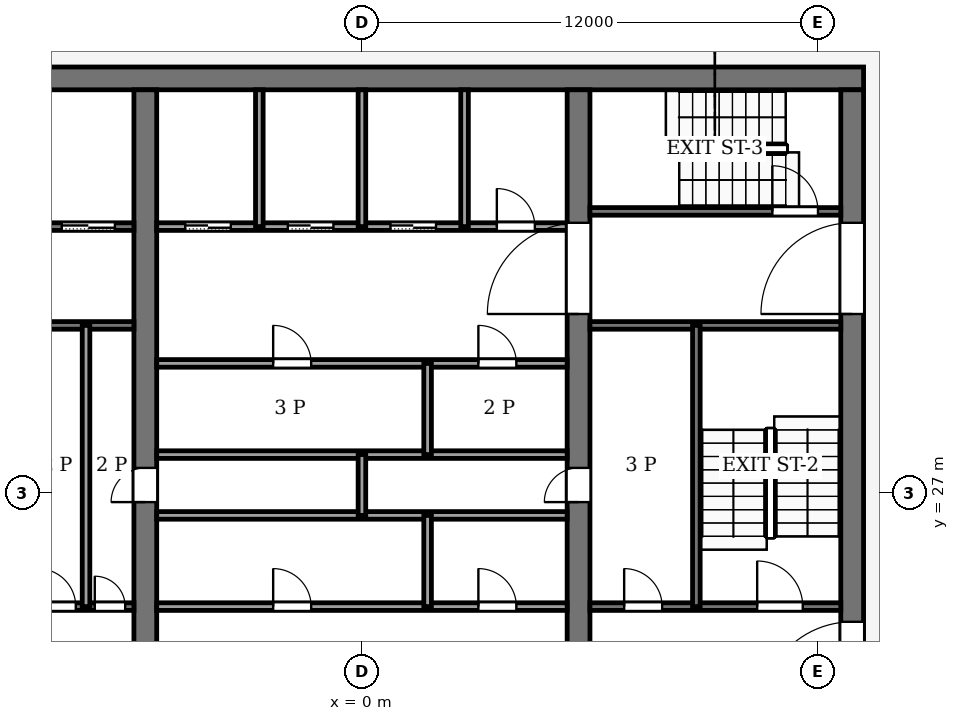
"""IFC4 building model, lengths in metres.
Left out: names, types, materials, properties, quantities, classifications, styles, units other than length and angle.
Written with IfcOpenShell. Run it as: python <this file> out.ifc"""

import sys

from ifc_helpers import new_model, si_unit, direction, frame, frame_2d, origin, place, context, subcontext, project, spatial, rectangle, extrude, element, fill, save


model = new_model("IFC4")
c1 = context("Model", 3, precision=1e-05, world=origin(), true_north=direction((0.0, 1.0)))
c2 = subcontext(c1, "Body", "Model", "MODEL_VIEW")
j1 = project(units=[si_unit("LENGTHUNIT", "METRE"), si_unit("PLANEANGLEUNIT", "RADIAN")], contexts=[c1])
p1 = place(None, origin())
s1 = spatial("IfcSite", under=j1, at=p1, CompositionType="ELEMENT")
p2 = place(p1, origin())
s2 = spatial("IfcBuilding", under=s1, at=p2, CompositionType="ELEMENT")
p3 = place(p2, frame((0.0, 0.0, 334.0)))
s3 = spatial("IfcBuildingStorey", under=s2, at=p3, CompositionType="ELEMENT", Elevation=334.0)
p4 = place(p3, frame((-13.2, 37.9, -0.18), z_axis=(0.0, 0.0, 1.0), x_axis=(1.0, 0.0, 0.0)))
e1 = element("IfcWall", 1, at=p4, inside=s3, PredefinedType="SHEAR", context=c2, shape_type="SweptSolid", body=[
    extrude(rectangle(XDim=26.4, YDim=0.6, at=frame_2d((13.2, 0.0))), origin(), (0.0, 0.0, 1.0), 6.53),
])
p5 = place(p3, frame((12.9, 18.4, -0.18), z_axis=(0.0, 0.0, 1.0), x_axis=(0.0, 1.0, 0.0)))
e2 = element("IfcWall", 2, at=p5, inside=s3, PredefinedType="SHEAR", context=c2, shape_type="SweptSolid", body=[
    extrude(rectangle(XDim=19.2, YDim=0.6, at=frame_2d((9.6, 0.0))), origin(), (0.0, 0.0, 1.0), 6.53),
])
p6 = place(p5, frame((2.8, 0.0, 0.18)))
e3 = element("IfcOpeningElement", 3, at=p6, cuts=e2, PredefinedType="OPENING", context=c2, shape_type="SweptSolid", body=[
    extrude(rectangle(XDim=2.4, YDim=2.4, at=frame_2d((1.2, 1.2))), frame((0.0, 0.31, 0.0), z_axis=(0.0, -1.0, 0.0), x_axis=(1.0, 0.0, 0.0)), (0.0, 0.0, 1.0), 0.62),
])
p7 = place(p5, frame((13.3, 0.0, 0.18)))
e4 = element("IfcOpeningElement", 4, at=p7, cuts=e2, PredefinedType="OPENING", context=c2, shape_type="SweptSolid", body=[
    extrude(rectangle(XDim=2.4, YDim=2.4, at=frame_2d((1.2, 1.2))), frame((0.0, 0.31, 0.0), z_axis=(0.0, -1.0, 0.0), x_axis=(1.0, 0.0, 0.0)), (0.0, 0.0, 1.0), 0.62),
])
p8 = place(p3, frame((-5.7, 18.4, -0.18), z_axis=(0.0, 0.0, 1.0), x_axis=(0.0, 1.0, 0.0)))
e5 = element("IfcWall", 5, at=p8, inside=s3, PredefinedType="SHEAR", context=c2, shape_type="SweptSolid", body=[
    extrude(rectangle(XDim=19.2, YDim=0.6, at=frame_2d((9.6, 0.0))), origin(), (0.0, 0.0, 1.0), 6.53),
])
p9 = place(p8, frame((8.35, 0.0, 0.18)))
e6 = element("IfcOpeningElement", 6, at=p9, cuts=e5, PredefinedType="OPENING", context=c2, shape_type="SweptSolid", body=[
    extrude(rectangle(XDim=0.9, YDim=2.1, at=frame_2d((0.45, 1.05))), frame((0.0, 0.31, 0.0), z_axis=(0.0, -1.0, 0.0), x_axis=(1.0, 0.0, 0.0)), (0.0, 0.0, 1.0), 0.62),
])
p10 = place(p3, frame((5.7, 18.4, -0.18), z_axis=(0.0, 0.0, 1.0), x_axis=(0.0, 1.0, 0.0)))
e7 = element("IfcWall", 7, at=p10, inside=s3, PredefinedType="SHEAR", context=c2, shape_type="SweptSolid", body=[
    extrude(rectangle(XDim=19.2, YDim=0.6, at=frame_2d((9.6, 0.0))), origin(), (0.0, 0.0, 1.0), 6.53),
])
p11 = place(p10, frame((8.35, 0.0, 0.18)))
e8 = element("IfcOpeningElement", 8, at=p11, cuts=e7, PredefinedType="OPENING", context=c2, shape_type="SweptSolid", body=[
    extrude(rectangle(XDim=0.9, YDim=2.1, at=frame_2d((0.45, 1.05))), frame((0.0, 0.31, 0.0), z_axis=(0.0, -1.0, 0.0), x_axis=(1.0, 0.0, 0.0)), (0.0, 0.0, 1.0), 0.62),
])
p12 = place(p10, frame((13.3, 0.0, 0.18)))
e9 = element("IfcOpeningElement", 9, at=p12, cuts=e7, PredefinedType="OPENING", context=c2, shape_type="SweptSolid", body=[
    extrude(rectangle(XDim=2.4, YDim=2.4, at=frame_2d((1.2, 1.2))), frame((0.0, 0.31, 0.0), z_axis=(0.0, -1.0, 0.0), x_axis=(1.0, 0.0, 0.0)), (0.0, 0.0, 1.0), 0.62),
])
p13 = place(p3, frame((-12.6, 24.0, 0.0), z_axis=(0.0, 0.0, 1.0), x_axis=(1.0, 0.0, 0.0)))
e10 = element("IfcWall", 10, at=p13, inside=s3, PredefinedType="PARTITIONING", context=c2, shape_type="SweptSolid", body=[
    extrude(rectangle(XDim=6.6, YDim=0.2, at=frame_2d((3.3, 0.0))), origin(), (0.0, 0.0, 1.0), 6.35),
])
p14 = place(p13, frame((4.07, 0.0, 0.0)))
e11 = element("IfcOpeningElement", 11, at=p14, cuts=e10, PredefinedType="OPENING", context=c2, shape_type="SweptSolid", body=[
    extrude(rectangle(XDim=1.0, YDim=2.1, at=frame_2d((0.5, 1.05))), frame((0.0, 0.11, 0.0), z_axis=(0.0, -1.0, 0.0), x_axis=(1.0, 0.0, 0.0)), (0.0, 0.0, 1.0), 0.22),
])
p15 = place(p13, frame((5.57, 0.0, 0.0)))
e12 = element("IfcOpeningElement", 12, at=p15, cuts=e10, PredefinedType="OPENING", context=c2, shape_type="SweptSolid", body=[
    extrude(rectangle(XDim=0.8, YDim=2.1, at=frame_2d((0.4, 1.05))), frame((0.0, 0.11, 0.0), z_axis=(0.0, -1.0, 0.0), x_axis=(1.0, 0.0, 0.0)), (0.0, 0.0, 1.0), 0.22),
])
p16 = place(p3, frame((-5.4, 24.0, 0.0), z_axis=(0.0, 0.0, 1.0), x_axis=(1.0, 0.0, 0.0)))
e13 = element("IfcWall", 13, at=p16, inside=s3, PredefinedType="PARTITIONING", context=c2, shape_type="SweptSolid", body=[
    extrude(rectangle(XDim=10.8, YDim=0.2, at=frame_2d((5.4, 0.0))), origin(), (0.0, 0.0, 1.0), 6.35),
])
p17 = place(p16, frame((3.064, 0.0, 0.0)))
e14 = element("IfcOpeningElement", 14, at=p17, cuts=e13, PredefinedType="OPENING", context=c2, shape_type="SweptSolid", body=[
    extrude(rectangle(XDim=1.0, YDim=2.1, at=frame_2d((0.5, 1.05))), frame((0.0, 0.11, 0.0), z_axis=(0.0, -1.0, 0.0), x_axis=(1.0, 0.0, 0.0)), (0.0, 0.0, 1.0), 0.22),
])
p18 = place(p16, frame((8.464, 0.0, 0.0)))
e15 = element("IfcOpeningElement", 15, at=p18, cuts=e13, PredefinedType="OPENING", context=c2, shape_type="SweptSolid", body=[
    extrude(rectangle(XDim=1.0, YDim=2.1, at=frame_2d((0.5, 1.05))), frame((0.0, 0.11, 0.0), z_axis=(0.0, -1.0, 0.0), x_axis=(1.0, 0.0, 0.0)), (0.0, 0.0, 1.0), 0.22),
])
p19 = place(p3, frame((6.0, 24.0, 0.0), z_axis=(0.0, 0.0, 1.0), x_axis=(1.0, 0.0, 0.0)))
e16 = element("IfcWall", 16, at=p19, inside=s3, PredefinedType="PARTITIONING", context=c2, shape_type="SweptSolid", body=[
    extrude(rectangle(XDim=6.6, YDim=0.2, at=frame_2d((3.3, 0.0))), origin(), (0.0, 0.0, 1.0), 6.35),
])
p20 = place(p19, frame((0.9, 0.0, 0.0)))
e17 = element("IfcOpeningElement", 17, at=p20, cuts=e16, PredefinedType="OPENING", context=c2, shape_type="SweptSolid", body=[
    extrude(rectangle(XDim=1.0, YDim=2.1, at=frame_2d((0.5, 1.05))), frame((0.0, 0.11, 0.0), z_axis=(0.0, -1.0, 0.0), x_axis=(1.0, 0.0, 0.0)), (0.0, 0.0, 1.0), 0.22),
])
p21 = place(p19, frame((4.4, 0.0, 0.0)))
e18 = element("IfcOpeningElement", 18, at=p21, cuts=e16, PredefinedType="OPENING", context=c2, shape_type="SweptSolid", body=[
    extrude(rectangle(XDim=1.2, YDim=2.2, at=frame_2d((0.6, 1.1))), frame((0.0, 0.11, 0.0), z_axis=(0.0, -1.0, 0.0), x_axis=(1.0, 0.0, 0.0)), (0.0, 0.0, 1.0), 0.22),
])
for number, where, z_axis, x_axis in (
    (19, (-5.4, 26.4, 0.0), (0.0, 0.0, 1.0), (1.0, 0.0, 0.0)),
    (20, (-5.4, 28.0, 0.0), (0.0, 0.0, 1.0), (1.0, 0.0, 0.0)),
):
    element("IfcWall", number, at=place(p3, frame(where, z_axis=z_axis, x_axis=x_axis)), inside=s3, PredefinedType="PARTITIONING", context=c2, shape_type="SweptSolid", body=[
        extrude(rectangle(XDim=10.8, YDim=0.2, at=frame_2d((5.4, 0.0))), origin(), (0.0, 0.0, 1.0), 6.35),
    ])
p22 = place(p3, frame((-5.4, 30.4, 0.0), z_axis=(0.0, 0.0, 1.0), x_axis=(1.0, 0.0, 0.0)))
e21 = element("IfcWall", 21, at=p22, inside=s3, PredefinedType="PARTITIONING", context=c2, shape_type="SweptSolid", body=[
    extrude(rectangle(XDim=10.8, YDim=0.2, at=frame_2d((5.4, 0.0))), origin(), (0.0, 0.0, 1.0), 6.35),
])
p23 = place(p22, frame((3.064, 0.0, 0.0)))
e22 = element("IfcOpeningElement", 22, at=p23, cuts=e21, PredefinedType="OPENING", context=c2, shape_type="SweptSolid", body=[
    extrude(rectangle(XDim=1.0, YDim=2.1, at=frame_2d((0.5, 1.05))), frame((0.0, 0.11, 0.0), z_axis=(0.0, -1.0, 0.0), x_axis=(1.0, 0.0, 0.0)), (0.0, 0.0, 1.0), 0.22),
])
p24 = place(p22, frame((8.464, 0.0, 0.0)))
e23 = element("IfcOpeningElement", 23, at=p24, cuts=e21, PredefinedType="OPENING", context=c2, shape_type="SweptSolid", body=[
    extrude(rectangle(XDim=1.0, YDim=2.1, at=frame_2d((0.5, 1.05))), frame((0.0, 0.11, 0.0), z_axis=(0.0, -1.0, 0.0), x_axis=(1.0, 0.0, 0.0)), (0.0, 0.0, 1.0), 0.22),
])
p25 = place(p3, frame((-12.6, 31.4, 0.0), z_axis=(0.0, 0.0, 1.0), x_axis=(1.0, 0.0, 0.0)))
e24 = element("IfcWall", 24, at=p25, inside=s3, PredefinedType="PARTITIONING", context=c2, shape_type="SweptSolid", body=[
    extrude(rectangle(XDim=6.6, YDim=0.2, at=frame_2d((3.3, 0.0))), origin(), (0.0, 0.0, 1.0), 6.35),
])
p26 = place(p25, frame((1.0, 0.0, 0.0)))
e25 = element("IfcOpeningElement", 25, at=p26, cuts=e24, PredefinedType="OPENING", context=c2, shape_type="SweptSolid", body=[
    extrude(rectangle(XDim=1.2, YDim=2.2, at=frame_2d((0.6, 1.1))), frame((0.0, 0.11, 0.0), z_axis=(0.0, -1.0, 0.0), x_axis=(1.0, 0.0, 0.0)), (0.0, 0.0, 1.0), 0.22),
])
p27 = place(p3, frame((6.0, 31.4, 0.0), z_axis=(0.0, 0.0, 1.0), x_axis=(1.0, 0.0, 0.0)))
e26 = element("IfcWall", 26, at=p27, inside=s3, PredefinedType="PARTITIONING", context=c2, shape_type="SweptSolid", body=[
    extrude(rectangle(XDim=6.6, YDim=0.2, at=frame_2d((3.3, 0.0))), origin(), (0.0, 0.0, 1.0), 6.35),
])
p28 = place(p3, frame((-12.6, 34.0, 0.0), z_axis=(0.0, 0.0, 1.0), x_axis=(1.0, 0.0, 0.0)))
e27 = element("IfcWall", 27, at=p28, inside=s3, PredefinedType="PARTITIONING", context=c2, shape_type="SweptSolid", body=[
    extrude(rectangle(XDim=6.6, YDim=0.2, at=frame_2d((3.3, 0.0))), origin(), (0.0, 0.0, 1.0), 6.35),
])
p29 = place(p28, frame((4.7, 0.0, 0.0)))
e28 = element("IfcOpeningElement", 28, at=p29, cuts=e27, PredefinedType="OPENING", context=c2, shape_type="SweptSolid", body=[
    extrude(rectangle(XDim=1.4, YDim=2.2, at=frame_2d((0.7, 1.1))), frame((0.0, 0.11, 0.0), z_axis=(0.0, -1.0, 0.0), x_axis=(1.0, 0.0, 0.0)), (0.0, 0.0, 1.0), 0.22),
])
p30 = place(p28, frame((2.3, 0.0, 0.0)))
e29 = element("IfcOpeningElement", 29, at=p30, cuts=e27, PredefinedType="OPENING", context=c2, shape_type="SweptSolid", body=[
    extrude(rectangle(XDim=1.4, YDim=2.2, at=frame_2d((0.7, 1.1))), frame((0.0, 0.11, 0.0), z_axis=(0.0, -1.0, 0.0), x_axis=(1.0, 0.0, 0.0)), (0.0, 0.0, 1.0), 0.22),
])
p31 = place(p28, frame((0.45, 0.0, 0.0)))
e30 = element("IfcOpeningElement", 30, at=p31, cuts=e27, PredefinedType="OPENING", context=c2, shape_type="SweptSolid", body=[
    extrude(rectangle(XDim=0.9, YDim=2.1, at=frame_2d((0.45, 1.05))), frame((0.0, 0.11, 0.0), z_axis=(0.0, -1.0, 0.0), x_axis=(1.0, 0.0, 0.0)), (0.0, 0.0, 1.0), 0.22),
])
p32 = place(p3, frame((-5.4, 34.0, 0.0), z_axis=(0.0, 0.0, 1.0), x_axis=(1.0, 0.0, 0.0)))
e31 = element("IfcWall", 31, at=p32, inside=s3, PredefinedType="PARTITIONING", context=c2, shape_type="SweptSolid", body=[
    extrude(rectangle(XDim=10.8, YDim=0.2, at=frame_2d((5.4, 0.0))), origin(), (0.0, 0.0, 1.0), 6.35),
])
p33 = place(p32, frame((0.75, 0.0, 0.0)))
e32 = element("IfcOpeningElement", 32, at=p33, cuts=e31, PredefinedType="OPENING", context=c2, shape_type="SweptSolid", body=[
    extrude(rectangle(XDim=1.2, YDim=2.2, at=frame_2d((0.6, 1.1))), frame((0.0, 0.11, 0.0), z_axis=(0.0, -1.0, 0.0), x_axis=(1.0, 0.0, 0.0)), (0.0, 0.0, 1.0), 0.22),
])
p34 = place(p32, frame((3.45, 0.0, 0.0)))
e33 = element("IfcOpeningElement", 33, at=p34, cuts=e31, PredefinedType="OPENING", context=c2, shape_type="SweptSolid", body=[
    extrude(rectangle(XDim=1.2, YDim=2.2, at=frame_2d((0.6, 1.1))), frame((0.0, 0.11, 0.0), z_axis=(0.0, -1.0, 0.0), x_axis=(1.0, 0.0, 0.0)), (0.0, 0.0, 1.0), 0.22),
])
p35 = place(p32, frame((6.15, 0.0, 0.0)))
e34 = element("IfcOpeningElement", 34, at=p35, cuts=e31, PredefinedType="OPENING", context=c2, shape_type="SweptSolid", body=[
    extrude(rectangle(XDim=1.2, YDim=2.2, at=frame_2d((0.6, 1.1))), frame((0.0, 0.11, 0.0), z_axis=(0.0, -1.0, 0.0), x_axis=(1.0, 0.0, 0.0)), (0.0, 0.0, 1.0), 0.22),
])
p36 = place(p32, frame((8.95, 0.0, 0.0)))
e35 = element("IfcOpeningElement", 35, at=p36, cuts=e31, PredefinedType="OPENING", context=c2, shape_type="SweptSolid", body=[
    extrude(rectangle(XDim=1.0, YDim=2.1, at=frame_2d((0.5, 1.05))), frame((0.0, 0.11, 0.0), z_axis=(0.0, -1.0, 0.0), x_axis=(1.0, 0.0, 0.0)), (0.0, 0.0, 1.0), 0.22),
])
p37 = place(p3, frame((6.0, 34.4, 0.0), z_axis=(0.0, 0.0, 1.0), x_axis=(1.0, 0.0, 0.0)))
e36 = element("IfcWall", 36, at=p37, inside=s3, PredefinedType="PARTITIONING", context=c2, shape_type="SweptSolid", body=[
    extrude(rectangle(XDim=6.6, YDim=0.2, at=frame_2d((3.3, 0.0))), origin(), (0.0, 0.0, 1.0), 6.35),
])
p38 = place(p37, frame((4.8, 0.0, 0.0)))
e37 = element("IfcOpeningElement", 37, at=p38, cuts=e36, PredefinedType="OPENING", context=c2, shape_type="SweptSolid", body=[
    extrude(rectangle(XDim=1.2, YDim=2.2, at=frame_2d((0.6, 1.1))), frame((0.0, 0.11, 0.0), z_axis=(0.0, -1.0, 0.0), x_axis=(1.0, 0.0, 0.0)), (0.0, 0.0, 1.0), 0.22),
])
p39 = place(p3, frame((-7.26, 24.0, 0.0), z_axis=(0.0, 0.0, 1.0), x_axis=(0.0, 1.0, 0.0)))
e38 = element("IfcWall", 38, at=p39, inside=s3, PredefinedType="PARTITIONING", context=c2, shape_type="SweptSolid", body=[
    extrude(rectangle(XDim=7.4, YDim=0.2, at=frame_2d((3.7, 0.0))), origin(), (0.0, 0.0, 1.0), 6.35),
])
p40 = place(p3, frame((-2.7, 34.0, 0.0), z_axis=(0.0, 0.0, 1.0), x_axis=(0.0, 1.0, 0.0)))
e39 = element("IfcWall", 39, at=p40, inside=s3, PredefinedType="PARTITIONING", context=c2, shape_type="SweptSolid", body=[
    extrude(rectangle(XDim=3.6, YDim=0.2, at=frame_2d((1.8, 0.0))), origin(), (0.0, 0.0, 1.0), 6.35),
])
p41 = place(p3, frame((0.0, 26.4, 0.0), z_axis=(0.0, 0.0, 1.0), x_axis=(0.0, 1.0, 0.0)))
e40 = element("IfcWall", 40, at=p41, inside=s3, PredefinedType="PARTITIONING", context=c2, shape_type="SweptSolid", body=[
    extrude(rectangle(XDim=1.6, YDim=0.2, at=frame_2d((0.8, 0.0))), origin(), (0.0, 0.0, 1.0), 6.35),
])
p42 = place(p3, frame((0.0, 34.0, 0.0), z_axis=(0.0, 0.0, 1.0), x_axis=(0.0, 1.0, 0.0)))
e41 = element("IfcWall", 41, at=p42, inside=s3, PredefinedType="PARTITIONING", context=c2, shape_type="SweptSolid", body=[
    extrude(rectangle(XDim=3.6, YDim=0.2, at=frame_2d((1.8, 0.0))), origin(), (0.0, 0.0, 1.0), 6.35),
])
for number, where, z_axis, x_axis in (
    (42, (1.728, 24.0, 0.0), (0.0, 0.0, 1.0), (0.0, 1.0, 0.0)),
    (43, (1.728, 28.0, 0.0), (0.0, 0.0, 1.0), (0.0, 1.0, 0.0)),
):
    element("IfcWall", number, at=place(p3, frame(where, z_axis=z_axis, x_axis=x_axis)), inside=s3, PredefinedType="PARTITIONING", context=c2, shape_type="SweptSolid", body=[
        extrude(rectangle(XDim=2.4, YDim=0.2, at=frame_2d((1.2, 0.0))), origin(), (0.0, 0.0, 1.0), 6.35),
    ])
p43 = place(p3, frame((2.7, 34.0, 0.0), z_axis=(0.0, 0.0, 1.0), x_axis=(0.0, 1.0, 0.0)))
e44 = element("IfcWall", 44, at=p43, inside=s3, PredefinedType="PARTITIONING", context=c2, shape_type="SweptSolid", body=[
    extrude(rectangle(XDim=3.6, YDim=0.2, at=frame_2d((1.8, 0.0))), origin(), (0.0, 0.0, 1.0), 6.35),
])
p44 = place(p3, frame((8.8, 24.0, 0.0), z_axis=(0.0, 0.0, 1.0), x_axis=(0.0, 1.0, 0.0)))
e45 = element("IfcWall", 45, at=p44, inside=s3, PredefinedType="PARTITIONING", context=c2, shape_type="SweptSolid", body=[
    extrude(rectangle(XDim=7.4, YDim=0.2, at=frame_2d((3.7, 0.0))), origin(), (0.0, 0.0, 1.0), 6.35),
])
p45 = place(p33, origin())
e46 = element("IfcDoor", 46, at=p45, inside=s3, OperationType="SLIDING_TO_LEFT", PredefinedType="DOOR", context=c2, shape_type="SweptSolid", body=[
    extrude(rectangle(XDim=1.2, YDim=2.2, at=frame_2d((0.6, 1.1))), frame((0.0, 0.025, 0.0), z_axis=(0.0, -1.0, 0.0), x_axis=(1.0, 0.0, 0.0)), (0.0, 0.0, 1.0), 0.05),
])
fill(e32, e46)
p46 = place(p34, origin())
e47 = element("IfcDoor", 47, at=p46, inside=s3, OperationType="SLIDING_TO_LEFT", PredefinedType="DOOR", context=c2, shape_type="SweptSolid", body=[
    extrude(rectangle(XDim=1.2, YDim=2.2, at=frame_2d((0.6, 1.1))), frame((0.0, 0.025, 0.0), z_axis=(0.0, -1.0, 0.0), x_axis=(1.0, 0.0, 0.0)), (0.0, 0.0, 1.0), 0.05),
])
fill(e33, e47)
p47 = place(p35, origin())
e48 = element("IfcDoor", 48, at=p47, inside=s3, OperationType="SLIDING_TO_LEFT", PredefinedType="DOOR", context=c2, shape_type="SweptSolid", body=[
    extrude(rectangle(XDim=1.2, YDim=2.2, at=frame_2d((0.6, 1.1))), frame((0.0, 0.025, 0.0), z_axis=(0.0, -1.0, 0.0), x_axis=(1.0, 0.0, 0.0)), (0.0, 0.0, 1.0), 0.05),
])
fill(e34, e48)
p48 = place(p29, origin())
e49 = element("IfcDoor", 49, at=p48, inside=s3, OperationType="SLIDING_TO_LEFT", PredefinedType="DOOR", context=c2, shape_type="SweptSolid", body=[
    extrude(rectangle(XDim=1.4, YDim=2.2, at=frame_2d((0.7, 1.1))), frame((0.0, 0.025, 0.0), z_axis=(0.0, -1.0, 0.0), x_axis=(1.0, 0.0, 0.0)), (0.0, 0.0, 1.0), 0.05),
])
fill(e28, e49)
p49 = place(p17, origin())
e50 = element("IfcDoor", 50, at=p49, inside=s3, OperationType="SINGLE_SWING_RIGHT", PredefinedType="DOOR", context=c2, shape_type="SweptSolid", body=[
    extrude(rectangle(XDim=1.0, YDim=2.1, at=frame_2d((0.5, 1.05))), frame((0.0, 0.025, 0.0), z_axis=(0.0, -1.0, 0.0), x_axis=(1.0, 0.0, 0.0)), (0.0, 0.0, 1.0), 0.05),
])
fill(e14, e50)
p50 = place(p18, origin())
e51 = element("IfcDoor", 51, at=p50, inside=s3, OperationType="SINGLE_SWING_LEFT", PredefinedType="DOOR", context=c2, shape_type="SweptSolid", body=[
    extrude(rectangle(XDim=1.0, YDim=2.1, at=frame_2d((0.5, 1.05))), frame((0.0, 0.025, 0.0), z_axis=(0.0, -1.0, 0.0), x_axis=(1.0, 0.0, 0.0)), (0.0, 0.0, 1.0), 0.05),
])
fill(e15, e51)
p51 = place(p23, origin())
e52 = element("IfcDoor", 52, at=p51, inside=s3, OperationType="SINGLE_SWING_RIGHT", PredefinedType="DOOR", context=c2, shape_type="SweptSolid", body=[
    extrude(rectangle(XDim=1.0, YDim=2.1, at=frame_2d((0.5, 1.05))), frame((0.0, 0.025, 0.0), z_axis=(0.0, -1.0, 0.0), x_axis=(1.0, 0.0, 0.0)), (0.0, 0.0, 1.0), 0.05),
])
fill(e22, e52)
p52 = place(p24, origin())
e53 = element("IfcDoor", 53, at=p52, inside=s3, OperationType="SINGLE_SWING_LEFT", PredefinedType="DOOR", context=c2, shape_type="SweptSolid", body=[
    extrude(rectangle(XDim=1.0, YDim=2.1, at=frame_2d((0.5, 1.05))), frame((0.0, 0.025, 0.0), z_axis=(0.0, -1.0, 0.0), x_axis=(1.0, 0.0, 0.0)), (0.0, 0.0, 1.0), 0.05),
])
fill(e23, e53)
p53 = place(p14, origin())
e54 = element("IfcDoor", 54, at=p53, inside=s3, OperationType="SINGLE_SWING_RIGHT", PredefinedType="DOOR", context=c2, shape_type="SweptSolid", body=[
    extrude(rectangle(XDim=1.0, YDim=2.1, at=frame_2d((0.5, 1.05))), frame((0.0, 0.025, 0.0), z_axis=(0.0, -1.0, 0.0), x_axis=(1.0, 0.0, 0.0)), (0.0, 0.0, 1.0), 0.05),
])
fill(e11, e54)
p54 = place(p15, origin())
e55 = element("IfcDoor", 55, at=p54, inside=s3, OperationType="SINGLE_SWING_LEFT", PredefinedType="DOOR", context=c2, shape_type="SweptSolid", body=[
    extrude(rectangle(XDim=0.8, YDim=2.1, at=frame_2d((0.4, 1.05))), frame((0.0, 0.025, 0.0), z_axis=(0.0, -1.0, 0.0), x_axis=(1.0, 0.0, 0.0)), (0.0, 0.0, 1.0), 0.05),
])
fill(e12, e55)
p55 = place(p20, origin())
e56 = element("IfcDoor", 56, at=p55, inside=s3, OperationType="SINGLE_SWING_RIGHT", PredefinedType="DOOR", context=c2, shape_type="SweptSolid", body=[
    extrude(rectangle(XDim=1.0, YDim=2.1, at=frame_2d((0.5, 1.05))), frame((0.0, 0.025, 0.0), z_axis=(0.0, -1.0, 0.0), x_axis=(1.0, 0.0, 0.0)), (0.0, 0.0, 1.0), 0.05),
])
fill(e17, e56)
p56 = place(p36, origin())
e57 = element("IfcDoor", 57, at=p56, inside=s3, OperationType="SINGLE_SWING_LEFT", PredefinedType="DOOR", context=c2, shape_type="SweptSolid", body=[
    extrude(rectangle(XDim=1.0, YDim=2.1, at=frame_2d((0.5, 1.05))), frame((0.0, 0.025, 0.0), z_axis=(0.0, -1.0, 0.0), x_axis=(1.0, 0.0, 0.0)), (0.0, 0.0, 1.0), 0.05),
])
fill(e35, e57)
p57 = place(p9, origin())
e58 = element("IfcDoor", 58, at=p57, inside=s3, OperationType="SINGLE_SWING_LEFT", PredefinedType="DOOR", context=c2, shape_type="SweptSolid", body=[
    extrude(rectangle(XDim=0.9, YDim=2.1, at=frame_2d((0.45, 1.05))), frame((0.0, 0.025, 0.0), z_axis=(0.0, -1.0, 0.0), x_axis=(1.0, 0.0, 0.0)), (0.0, 0.0, 1.0), 0.05),
])
fill(e6, e58)
p58 = place(p11, origin())
e59 = element("IfcDoor", 59, at=p58, inside=s3, OperationType="SINGLE_SWING_RIGHT", PredefinedType="DOOR", context=c2, shape_type="SweptSolid", body=[
    extrude(rectangle(XDim=0.9, YDim=2.1, at=frame_2d((0.45, 1.05))), frame((0.0, 0.025, 0.0), z_axis=(0.0, -1.0, 0.0), x_axis=(1.0, 0.0, 0.0)), (0.0, 0.0, 1.0), 0.05),
])
fill(e8, e59)
p59 = place(p21, origin())
e60 = element("IfcDoor", 60, at=p59, inside=s3, OperationType="SINGLE_SWING_LEFT", PredefinedType="DOOR", context=c2, shape_type="SweptSolid", body=[
    extrude(rectangle(XDim=1.2, YDim=2.2, at=frame_2d((0.6, 1.1))), frame((0.0, 0.025, 0.0), z_axis=(0.0, -1.0, 0.0), x_axis=(1.0, 0.0, 0.0)), (0.0, 0.0, 1.0), 0.05),
])
fill(e18, e60)
p60 = place(p38, origin())
e61 = element("IfcDoor", 61, at=p60, inside=s3, OperationType="SINGLE_SWING_RIGHT", PredefinedType="DOOR", context=c2, shape_type="SweptSolid", body=[
    extrude(rectangle(XDim=1.2, YDim=2.2, at=frame_2d((0.6, 1.1))), frame((0.0, 0.025, 0.0), z_axis=(0.0, -1.0, 0.0), x_axis=(1.0, 0.0, 0.0)), (0.0, 0.0, 1.0), 0.05),
])
fill(e37, e61)
p61 = place(p12, origin())
e62 = element("IfcDoor", 62, at=p61, inside=s3, OperationType="DOUBLE_DOOR_SINGLE_SWING", PredefinedType="DOOR", context=c2, shape_type="SweptSolid", body=[
    extrude(rectangle(XDim=2.4, YDim=2.4, at=frame_2d((1.2, 1.2))), frame((0.0, 0.025, 0.0), z_axis=(0.0, -1.0, 0.0), x_axis=(1.0, 0.0, 0.0)), (0.0, 0.0, 1.0), 0.05),
])
fill(e9, e62)
p62 = place(p6, origin())
e63 = element("IfcDoor", 63, at=p62, inside=s3, OperationType="DOUBLE_DOOR_SINGLE_SWING", PredefinedType="DOOR", context=c2, shape_type="SweptSolid", body=[
    extrude(rectangle(XDim=2.4, YDim=2.4, at=frame_2d((1.2, 1.2))), frame((0.0, 0.025, 0.0), z_axis=(0.0, -1.0, 0.0), x_axis=(1.0, 0.0, 0.0)), (0.0, 0.0, 1.0), 0.05),
])
fill(e3, e63)
p63 = place(p7, origin())
e64 = element("IfcDoor", 64, at=p63, inside=s3, OperationType="DOUBLE_DOOR_SINGLE_SWING", PredefinedType="DOOR", context=c2, shape_type="SweptSolid", body=[
    extrude(rectangle(XDim=2.4, YDim=2.4, at=frame_2d((1.2, 1.2))), frame((0.0, 0.025, 0.0), z_axis=(0.0, -1.0, 0.0), x_axis=(1.0, 0.0, 0.0)), (0.0, 0.0, 1.0), 0.05),
])
fill(e4, e64)
save(model, sys.argv[1])
